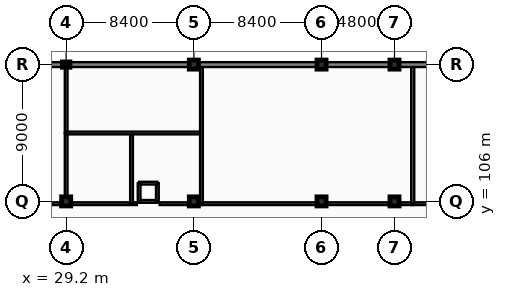
"""IFC4 building model, lengths in metres.
Left out: names, types, materials, properties, quantities, classifications, styles, units other than length and angle.
Written with IfcOpenShell. Run it as: python <this file> out.ifc"""

import sys

from ifc_helpers import new_model, si_unit, direction, frame, frame_2d, origin, origin_2d, place, context, subcontext, project, spatial, rectangle, extrude, element, fill, save


model = new_model("IFC4")
c1 = context("Model", 3, precision=1e-05, world=origin(), true_north=direction((0.0, 1.0)))
c2 = subcontext(c1, "Body", "Model", "MODEL_VIEW")
j1 = project(units=[si_unit("LENGTHUNIT", "METRE"), si_unit("PLANEANGLEUNIT", "RADIAN")], contexts=[c1])
p1 = place(None, origin())
s1 = spatial("IfcSite", under=j1, at=p1, CompositionType="ELEMENT")
p2 = place(p1, origin())
s2 = spatial("IfcBuilding", under=s1, at=p2, CompositionType="ELEMENT")
p3 = place(p2, origin())
s3 = spatial("IfcBuildingStorey", under=s2, at=p3, CompositionType="ELEMENT", Elevation=0.0)
p4 = place(p3, frame((29.2, 106.0, 0.0), z_axis=(0.0, 0.0, 1.0), x_axis=(1.0, 0.0, 0.0)))
e1 = element("IfcColumn", 1, at=p4, inside=s3, PredefinedType="COLUMN", context=c2, shape_type="SweptSolid", body=[
    extrude(rectangle(XDim=0.6, YDim=0.6, at=origin_2d()), origin(), (0.0, 0.0, 1.0), 5.4),
])
p5 = place(p3, frame((29.2, 115.0, 0.0), z_axis=(0.0, 0.0, 1.0), x_axis=(1.0, 0.0, 0.0)))
e2 = element("IfcColumn", 2, at=p5, inside=s3, PredefinedType="PILASTER", context=c2, shape_type="SweptSolid", body=[
    extrude(rectangle(XDim=0.5, YDim=0.35, at=origin_2d()), origin(), (0.0, 0.0, 1.0), 5.4),
])
for number, where, z_axis, x_axis in (
    (3, (37.6, 106.0, 0.0), (0.0, 0.0, 1.0), (1.0, 0.0, 0.0)),
    (4, (37.6, 115.0, 0.0), (0.0, 0.0, 1.0), (1.0, 0.0, 0.0)),
    (5, (46.0, 106.0, 0.0), (0.0, 0.0, 1.0), (1.0, 0.0, 0.0)),
    (6, (46.0, 115.0, 0.0), (0.0, 0.0, 1.0), (1.0, 0.0, 0.0)),
    (7, (50.8, 106.0, 0.0), (0.0, 0.0, 1.0), (1.0, 0.0, 0.0)),
    (8, (50.8, 115.0, 0.0), (0.0, 0.0, 1.0), (1.0, 0.0, 0.0)),
):
    element("IfcColumn", number, at=place(p3, frame(where, z_axis=z_axis, x_axis=x_axis)), inside=s3, PredefinedType="COLUMN", context=c2, shape_type="SweptSolid", body=[
        extrude(rectangle(XDim=0.6, YDim=0.6, at=origin_2d()), origin(), (0.0, 0.0, 1.0), 5.4),
    ])
p6 = place(p3, frame((4.15, 105.85, 0.0), z_axis=(0.0, 0.0, 1.0), x_axis=(1.0, 0.0, 0.0)))
e9 = element("IfcWall", 9, at=p6, inside=s3, PredefinedType="PARTITIONING", context=c2, shape_type="SweptSolid", body=[
    extrude(rectangle(XDim=25.05, YDim=0.18, at=frame_2d((12.525, 0.0))), origin(), (0.0, 0.0, 1.0), 4.54),
])
p7 = place(p6, frame((10.822, 0.0, -0.01)))
e10 = element("IfcOpeningElement", 10, at=p7, cuts=e9, PredefinedType="OPENING", context=c2, shape_type="SweptSolid", body=[
    extrude(rectangle(XDim=1.0, YDim=2.16, at=frame_2d((0.5, 1.08))), frame((0.0, 0.1, 0.0), z_axis=(0.0, -1.0, 0.0), x_axis=(1.0, 0.0, 0.0)), (0.0, 0.0, 1.0), 0.2),
])
p8 = place(p3, frame((29.2, 105.85, 0.0), z_axis=(0.0, 0.0, 1.0), x_axis=(1.0, 0.0, 0.0)))
e11 = element("IfcWall", 11, at=p8, inside=s3, PredefinedType="PARTITIONING", context=c2, shape_type="SweptSolid", body=[
    extrude(rectangle(XDim=4.65, YDim=0.18, at=frame_2d((2.325, 0.0))), origin(), (0.0, 0.0, 1.0), 4.54),
])
p9 = place(p8, frame((1.643, 0.0, -0.01)))
e12 = element("IfcOpeningElement", 12, at=p9, cuts=e11, PredefinedType="OPENING", context=c2, shape_type="SweptSolid", body=[
    extrude(rectangle(XDim=1.0, YDim=2.16, at=frame_2d((0.5, 1.08))), frame((0.0, 0.1, 0.0), z_axis=(0.0, -1.0, 0.0), x_axis=(1.0, 0.0, 0.0)), (0.0, 0.0, 1.0), 0.2),
])
p10 = place(p3, frame((35.35, 105.85, 0.0), z_axis=(0.0, 0.0, 1.0), x_axis=(1.0, 0.0, 0.0)))
e13 = element("IfcWall", 13, at=p10, inside=s3, PredefinedType="PARTITIONING", context=c2, shape_type="SweptSolid", body=[
    extrude(rectangle(XDim=2.75, YDim=0.18, at=frame_2d((1.375, 0.0))), origin(), (0.0, 0.0, 1.0), 4.54),
])
p11 = place(p10, frame((0.28, 0.0, -0.01)))
e14 = element("IfcOpeningElement", 14, at=p11, cuts=e13, PredefinedType="OPENING", context=c2, shape_type="SweptSolid", body=[
    extrude(rectangle(XDim=1.0, YDim=2.16, at=frame_2d((0.5, 1.08))), frame((0.0, 0.1, 0.0), z_axis=(0.0, -1.0, 0.0), x_axis=(1.0, 0.0, 0.0)), (0.0, 0.0, 1.0), 0.2),
])
p12 = place(p3, frame((38.1, 105.85, 0.0), z_axis=(0.0, 0.0, 1.0), x_axis=(1.0, 0.0, 0.0)))
e15 = element("IfcWall", 15, at=p12, inside=s3, PredefinedType="PARTITIONING", context=c2, shape_type="SweptSolid", body=[
    extrude(rectangle(XDim=13.9, YDim=0.18, at=frame_2d((6.95, 0.0))), origin(), (0.0, 0.0, 1.0), 4.54),
])
p13 = place(p12, frame((5.805, 0.0, -0.01)))
e16 = element("IfcOpeningElement", 16, at=p13, cuts=e15, PredefinedType="OPENING", context=c2, shape_type="SweptSolid", body=[
    extrude(rectangle(XDim=1.0, YDim=2.16, at=frame_2d((0.5, 1.08))), frame((0.0, 0.1, 0.0), z_axis=(0.0, -1.0, 0.0), x_axis=(1.0, 0.0, 0.0)), (0.0, 0.0, 1.0), 0.2),
])
p14 = place(p3, frame((52.0, 105.85, 0.0), z_axis=(0.0, 0.0, 1.0), x_axis=(1.0, 0.0, 0.0)))
e17 = element("IfcWall", 17, at=p14, inside=s3, PredefinedType="PARTITIONING", context=c2, shape_type="SweptSolid", body=[
    extrude(rectangle(XDim=23.4, YDim=0.18, at=frame_2d((11.7, 0.0))), origin(), (0.0, 0.0, 1.0), 4.54),
])
p15 = place(p3, frame((29.2, 105.85, 0.0), z_axis=(0.0, 0.0, 1.0), x_axis=(0.0, 1.0, 0.0)))
e18 = element("IfcWall", 18, at=p15, inside=s3, PredefinedType="PARTITIONING", context=c2, shape_type="SweptSolid", body=[
    extrude(rectangle(XDim=4.65, YDim=0.18, at=frame_2d((2.325, 0.0))), origin(), (0.0, 0.0, 1.0), 4.54),
])
p16 = place(p3, frame((29.2, 110.5, 0.0), z_axis=(0.0, 0.0, 1.0), x_axis=(0.0, 1.0, 0.0)))
e19 = element("IfcWall", 19, at=p16, inside=s3, PredefinedType="PARTITIONING", context=c2, shape_type="SweptSolid", body=[
    extrude(rectangle(XDim=4.35, YDim=0.18, at=frame_2d((2.175, 0.0))), origin(), (0.0, 0.0, 1.0), 4.64),
])
p17 = place(p16, frame((1.675, 0.0, -0.01)))
e20 = element("IfcOpeningElement", 20, at=p17, cuts=e19, PredefinedType="OPENING", context=c2, shape_type="SweptSolid", body=[
    extrude(rectangle(XDim=1.0, YDim=2.16, at=frame_2d((0.5, 1.08))), frame((0.0, 0.1, 0.0), z_axis=(0.0, -1.0, 0.0), x_axis=(1.0, 0.0, 0.0)), (0.0, 0.0, 1.0), 0.2),
])
p18 = place(p3, frame((33.5, 105.85, 0.0), z_axis=(0.0, 0.0, 1.0), x_axis=(0.0, 1.0, 0.0)))
e21 = element("IfcWall", 21, at=p18, inside=s3, PredefinedType="PARTITIONING", context=c2, shape_type="SweptSolid", body=[
    extrude(rectangle(XDim=4.65, YDim=0.18, at=frame_2d((2.325, 0.0))), origin(), (0.0, 0.0, 1.0), 5.04),
])
p19 = place(p3, frame((29.2, 110.5, 0.0), z_axis=(0.0, 0.0, 1.0), x_axis=(1.0, 0.0, 0.0)))
e22 = element("IfcWall", 22, at=p19, inside=s3, PredefinedType="PARTITIONING", context=c2, shape_type="SweptSolid", body=[
    extrude(rectangle(XDim=8.9, YDim=0.18, at=frame_2d((4.45, 0.0))), origin(), (0.0, 0.0, 1.0), 4.64),
])
p20 = place(p19, frame((1.975, 0.0, -0.01)))
e23 = element("IfcOpeningElement", 23, at=p20, cuts=e22, PredefinedType="OPENING", context=c2, shape_type="SweptSolid", body=[
    extrude(rectangle(XDim=1.0, YDim=2.16, at=frame_2d((0.5, 1.08))), frame((0.0, 0.1, 0.0), z_axis=(0.0, -1.0, 0.0), x_axis=(1.0, 0.0, 0.0)), (0.0, 0.0, 1.0), 0.2),
])
p21 = place(p3, frame((38.1, 105.85, 0.0), z_axis=(0.0, 0.0, 1.0), x_axis=(0.0, 1.0, 0.0)))
e24 = element("IfcWall", 24, at=p21, inside=s3, PredefinedType="PARTITIONING", context=c2, shape_type="SweptSolid", body=[
    extrude(rectangle(XDim=9.0, YDim=0.18, at=frame_2d((4.5, 0.0))), origin(), (0.0, 0.0, 1.0), 4.54),
])
p22 = place(p3, frame((52.0, 105.85, 0.0), z_axis=(0.0, 0.0, 1.0), x_axis=(0.0, 1.0, 0.0)))
e25 = element("IfcWall", 25, at=p22, inside=s3, PredefinedType="PARTITIONING", context=c2, shape_type="SweptSolid", body=[
    extrude(rectangle(XDim=9.0, YDim=0.2, at=frame_2d((4.5, 0.0))), origin(), (0.0, 0.0, 1.0), 4.54),
])
p23 = place(p3, frame((29.2, 115.0, 0.0), z_axis=(0.0, 0.0, 1.0), x_axis=(-1.0, 0.0, 0.0)))
e26 = element("IfcWall", 26, at=p23, inside=s3, PredefinedType="SOLIDWALL", context=c2, shape_type="SweptSolid", body=[
    extrude(rectangle(XDim=8.4, YDim=0.32, at=frame_2d((4.2, 0.0))), origin(), (0.0, 0.0, 1.0), 4.64),
])
p24 = place(p23, frame((0.46, 0.0, 0.9)))
e27 = element("IfcOpeningElement", 27, at=p24, cuts=e26, PredefinedType="OPENING", context=c2, shape_type="SweptSolid", body=[
    extrude(rectangle(XDim=2.4, YDim=2.35, at=frame_2d((1.2, 1.175))), frame((0.0, 0.17, 0.0), z_axis=(0.0, -1.0, 0.0), x_axis=(1.0, 0.0, 0.0)), (0.0, 0.0, 1.0), 0.34),
])
p25 = place(p23, frame((5.46, 0.0, 0.9)))
e28 = element("IfcOpeningElement", 28, at=p25, cuts=e26, PredefinedType="OPENING", context=c2, shape_type="SweptSolid", body=[
    extrude(rectangle(XDim=2.4, YDim=2.35, at=frame_2d((1.2, 1.175))), frame((0.0, 0.17, 0.0), z_axis=(0.0, -1.0, 0.0), x_axis=(1.0, 0.0, 0.0)), (0.0, 0.0, 1.0), 0.34),
])
p26 = place(p3, frame((37.6, 115.0, 0.0), z_axis=(0.0, 0.0, 1.0), x_axis=(-1.0, 0.0, 0.0)))
e29 = element("IfcWall", 29, at=p26, inside=s3, PredefinedType="SOLIDWALL", context=c2, shape_type="SweptSolid", body=[
    extrude(rectangle(XDim=8.4, YDim=0.32, at=frame_2d((4.2, 0.0))), origin(), (0.0, 0.0, 1.0), 4.64),
])
p27 = place(p26, frame((0.46, 0.0, 0.9)))
e30 = element("IfcOpeningElement", 30, at=p27, cuts=e29, PredefinedType="OPENING", context=c2, shape_type="SweptSolid", body=[
    extrude(rectangle(XDim=2.4, YDim=2.35, at=frame_2d((1.2, 1.175))), frame((0.0, 0.17, 0.0), z_axis=(0.0, -1.0, 0.0), x_axis=(1.0, 0.0, 0.0)), (0.0, 0.0, 1.0), 0.34),
])
p28 = place(p26, frame((5.46, 0.0, 0.9)))
e31 = element("IfcOpeningElement", 31, at=p28, cuts=e29, PredefinedType="OPENING", context=c2, shape_type="SweptSolid", body=[
    extrude(rectangle(XDim=2.4, YDim=2.35, at=frame_2d((1.2, 1.175))), frame((0.0, 0.17, 0.0), z_axis=(0.0, -1.0, 0.0), x_axis=(1.0, 0.0, 0.0)), (0.0, 0.0, 1.0), 0.34),
])
p29 = place(p3, frame((46.0, 115.0, 0.0), z_axis=(0.0, 0.0, 1.0), x_axis=(-1.0, 0.0, 0.0)))
e32 = element("IfcWall", 32, at=p29, inside=s3, PredefinedType="SOLIDWALL", context=c2, shape_type="SweptSolid", body=[
    extrude(rectangle(XDim=8.4, YDim=0.32, at=frame_2d((4.2, 0.0))), origin(), (0.0, 0.0, 1.0), 4.64),
])
p30 = place(p29, frame((3.2, 0.0, -0.01)))
e33 = element("IfcOpeningElement", 33, at=p30, cuts=e32, PredefinedType="OPENING", context=c2, shape_type="SweptSolid", body=[
    extrude(rectangle(XDim=2.0, YDim=2.41, at=frame_2d((1.0, 1.205))), frame((0.0, 0.17, 0.0), z_axis=(0.0, -1.0, 0.0), x_axis=(1.0, 0.0, 0.0)), (0.0, 0.0, 1.0), 0.34),
])
p31 = place(p3, frame((50.8, 115.0, 0.0), z_axis=(0.0, 0.0, 1.0), x_axis=(-1.0, 0.0, 0.0)))
e34 = element("IfcWall", 34, at=p31, inside=s3, PredefinedType="SOLIDWALL", context=c2, shape_type="SweptSolid", body=[
    extrude(rectangle(XDim=4.8, YDim=0.32, at=frame_2d((2.4, 0.0))), origin(), (0.0, 0.0, 1.0), 4.64),
])
p32 = place(p31, frame((1.46, 0.0, 0.9)))
e35 = element("IfcOpeningElement", 35, at=p32, cuts=e34, PredefinedType="OPENING", context=c2, shape_type="SweptSolid", body=[
    extrude(rectangle(XDim=1.8, YDim=2.2, at=frame_2d((0.9, 1.1))), frame((0.0, 0.17, 0.0), z_axis=(0.0, -1.0, 0.0), x_axis=(1.0, 0.0, 0.0)), (0.0, 0.0, 1.0), 0.34),
])
p33 = place(p3, frame((58.0, 115.0, 0.0), z_axis=(0.0, 0.0, 1.0), x_axis=(-1.0, 0.0, 0.0)))
e36 = element("IfcWall", 36, at=p33, inside=s3, PredefinedType="SOLIDWALL", context=c2, shape_type="SweptSolid", body=[
    extrude(rectangle(XDim=7.2, YDim=0.32, at=frame_2d((3.6, 0.0))), origin(), (0.0, 0.0, 1.0), 4.64),
])
p34 = place(p33, frame((0.46, 0.0, 0.9)))
e37 = element("IfcOpeningElement", 37, at=p34, cuts=e36, PredefinedType="OPENING", context=c2, shape_type="SweptSolid", body=[
    extrude(rectangle(XDim=1.8, YDim=2.2, at=frame_2d((0.9, 1.1))), frame((0.0, 0.17, 0.0), z_axis=(0.0, -1.0, 0.0), x_axis=(1.0, 0.0, 0.0)), (0.0, 0.0, 1.0), 0.34),
])
p35 = place(p33, frame((3.86, 0.0, 0.9)))
e38 = element("IfcOpeningElement", 38, at=p35, cuts=e36, PredefinedType="OPENING", context=c2, shape_type="SweptSolid", body=[
    extrude(rectangle(XDim=1.8, YDim=2.2, at=frame_2d((0.9, 1.1))), frame((0.0, 0.17, 0.0), z_axis=(0.0, -1.0, 0.0), x_axis=(1.0, 0.0, 0.0)), (0.0, 0.0, 1.0), 0.34),
])
p36 = place(p3, frame((34.0, 106.0, 0.0), z_axis=(0.0, 0.0, 1.0), x_axis=(1.0, 0.0, 0.0)))
e39 = element("IfcWall", 39, at=p36, inside=s3, PredefinedType="SOLIDWALL", context=c2, shape_type="SweptSolid", body=[
    extrude(rectangle(XDim=1.2, YDim=0.18, at=frame_2d((0.6, 0.0))), origin(), (0.0, 0.0, 1.0), 5.07),
])
p37 = place(p36, frame((0.2, 0.0, -0.01)))
e40 = element("IfcOpeningElement", 40, at=p37, cuts=e39, PredefinedType="OPENING", context=c2, shape_type="SweptSolid", body=[
    extrude(rectangle(XDim=0.8, YDim=2.06, at=frame_2d((0.4, 1.03))), frame((0.0, 0.1, 0.0), z_axis=(0.0, -1.0, 0.0), x_axis=(1.0, 0.0, 0.0)), (0.0, 0.0, 1.0), 0.2),
])
for number, where, z_axis, x_axis in (
    (41, (35.2, 106.0, 0.0), (0.0, 0.0, 1.0), (0.0, 1.0, 0.0)),
    (42, (35.2, 107.2, 0.0), (0.0, 0.0, 1.0), (-1.0, 0.0, 0.0)),
    (43, (34.0, 107.2, 0.0), (0.0, 0.0, 1.0), (0.0, -1.0, 0.0)),
):
    element("IfcWall", number, at=place(p3, frame(where, z_axis=z_axis, x_axis=x_axis)), inside=s3, PredefinedType="SOLIDWALL", context=c2, shape_type="SweptSolid", body=[
        extrude(rectangle(XDim=1.2, YDim=0.18, at=frame_2d((0.6, 0.0))), origin(), (0.0, 0.0, 1.0), 5.07),
    ])
p38 = place(p9, frame((1.0, 0.0, 0.01), z_axis=(0.0, 0.0, 1.0), x_axis=(-1.0, 0.0, 0.0)))
e44 = element("IfcDoor", 44, at=p38, inside=s3, OperationType="SINGLE_SWING_LEFT", PredefinedType="DOOR", context=c2, shape_type="SweptSolid", body=[
    extrude(rectangle(XDim=1.0, YDim=2.15, at=frame_2d((0.5, 1.075))), frame((0.0, 0.025, 0.0), z_axis=(0.0, -1.0, 0.0), x_axis=(1.0, 0.0, 0.0)), (0.0, 0.0, 1.0), 0.05),
])
fill(e12, e44)
p39 = place(p11, frame((0.0, 0.0, 0.01)))
e45 = element("IfcDoor", 45, at=p39, inside=s3, OperationType="SINGLE_SWING_RIGHT", PredefinedType="DOOR", context=c2, shape_type="SweptSolid", body=[
    extrude(rectangle(XDim=1.0, YDim=2.15, at=frame_2d((0.5, 1.075))), frame((0.0, 0.025, 0.0), z_axis=(0.0, -1.0, 0.0), x_axis=(1.0, 0.0, 0.0)), (0.0, 0.0, 1.0), 0.05),
])
fill(e14, e45)
p40 = place(p13, frame((0.0, 0.0, 0.01)))
e46 = element("IfcDoor", 46, at=p40, inside=s3, OperationType="SINGLE_SWING_LEFT", PredefinedType="DOOR", context=c2, shape_type="SweptSolid", body=[
    extrude(rectangle(XDim=1.0, YDim=2.15, at=frame_2d((0.5, 1.075))), frame((0.0, 0.025, 0.0), z_axis=(0.0, -1.0, 0.0), x_axis=(1.0, 0.0, 0.0)), (0.0, 0.0, 1.0), 0.05),
])
fill(e16, e46)
p41 = place(p17, frame((1.0, 0.0, 0.01), z_axis=(0.0, 0.0, 1.0), x_axis=(-1.0, 0.0, 0.0)))
e47 = element("IfcDoor", 47, at=p41, inside=s3, OperationType="SINGLE_SWING_RIGHT", PredefinedType="DOOR", context=c2, shape_type="SweptSolid", body=[
    extrude(rectangle(XDim=1.0, YDim=2.15, at=frame_2d((0.5, 1.075))), frame((0.0, 0.025, 0.0), z_axis=(0.0, -1.0, 0.0), x_axis=(1.0, 0.0, 0.0)), (0.0, 0.0, 1.0), 0.05),
])
fill(e20, e47)
p42 = place(p20, frame((0.0, 0.0, 0.01)))
e48 = element("IfcDoor", 48, at=p42, inside=s3, OperationType="SINGLE_SWING_LEFT", PredefinedType="DOOR", context=c2, shape_type="SweptSolid", body=[
    extrude(rectangle(XDim=1.0, YDim=2.15, at=frame_2d((0.5, 1.075))), frame((0.0, 0.025, 0.0), z_axis=(0.0, -1.0, 0.0), x_axis=(1.0, 0.0, 0.0)), (0.0, 0.0, 1.0), 0.05),
])
fill(e23, e48)
p43 = place(p24, origin())
e49 = element("IfcWindow", 49, at=p43, inside=s3, PartitioningType="TRIPLE_PANEL_VERTICAL", PredefinedType="WINDOW", context=c2, shape_type="SweptSolid", body=[
    extrude(rectangle(XDim=2.4, YDim=2.35, at=frame_2d((1.2, 1.175))), frame((0.0, 0.03, 0.0), z_axis=(0.0, -1.0, 0.0), x_axis=(1.0, 0.0, 0.0)), (0.0, 0.0, 1.0), 0.06),
])
fill(e27, e49)
p44 = place(p27, origin())
e50 = element("IfcWindow", 50, at=p44, inside=s3, PartitioningType="TRIPLE_PANEL_VERTICAL", PredefinedType="WINDOW", context=c2, shape_type="SweptSolid", body=[
    extrude(rectangle(XDim=2.4, YDim=2.35, at=frame_2d((1.2, 1.175))), frame((0.0, 0.03, 0.0), z_axis=(0.0, -1.0, 0.0), x_axis=(1.0, 0.0, 0.0)), (0.0, 0.0, 1.0), 0.06),
])
fill(e30, e50)
p45 = place(p28, origin())
e51 = element("IfcWindow", 51, at=p45, inside=s3, PartitioningType="TRIPLE_PANEL_VERTICAL", PredefinedType="WINDOW", context=c2, shape_type="SweptSolid", body=[
    extrude(rectangle(XDim=2.4, YDim=2.35, at=frame_2d((1.2, 1.175))), frame((0.0, 0.03, 0.0), z_axis=(0.0, -1.0, 0.0), x_axis=(1.0, 0.0, 0.0)), (0.0, 0.0, 1.0), 0.06),
])
fill(e31, e51)
p46 = place(p30, frame((0.0, 0.0, 0.01)))
e52 = element("IfcDoor", 52, at=p46, inside=s3, OperationType="DOUBLE_SWING_LEFT", PredefinedType="DOOR", context=c2, shape_type="SweptSolid", body=[
    extrude(rectangle(XDim=2.0, YDim=2.4, at=frame_2d((1.0, 1.2))), frame((0.0, 0.025, 0.0), z_axis=(0.0, -1.0, 0.0), x_axis=(1.0, 0.0, 0.0)), (0.0, 0.0, 1.0), 0.05),
])
fill(e33, e52)
p47 = place(p32, origin())
e53 = element("IfcWindow", 53, at=p47, inside=s3, PartitioningType="DOUBLE_PANEL_VERTICAL", PredefinedType="WINDOW", context=c2, shape_type="SweptSolid", body=[
    extrude(rectangle(XDim=1.8, YDim=2.2, at=frame_2d((0.9, 1.1))), frame((0.0, 0.03, 0.0), z_axis=(0.0, -1.0, 0.0), x_axis=(1.0, 0.0, 0.0)), (0.0, 0.0, 1.0), 0.06),
])
fill(e35, e53)
p48 = place(p35, origin())
e54 = element("IfcWindow", 54, at=p48, inside=s3, PartitioningType="DOUBLE_PANEL_VERTICAL", PredefinedType="WINDOW", context=c2, shape_type="SweptSolid", body=[
    extrude(rectangle(XDim=1.8, YDim=2.2, at=frame_2d((0.9, 1.1))), frame((0.0, 0.03, 0.0), z_axis=(0.0, -1.0, 0.0), x_axis=(1.0, 0.0, 0.0)), (0.0, 0.0, 1.0), 0.06),
])
fill(e38, e54)
p49 = place(p37, frame((0.0, 0.0, 0.01)))
e55 = element("IfcDoor", 55, at=p49, inside=s3, OperationType="SINGLE_SWING_LEFT", PredefinedType="DOOR", context=c2, shape_type="SweptSolid", body=[
    extrude(rectangle(XDim=0.8, YDim=2.05, at=frame_2d((0.4, 1.025))), frame((0.0, 0.025, 0.0), z_axis=(0.0, -1.0, 0.0), x_axis=(1.0, 0.0, 0.0)), (0.0, 0.0, 1.0), 0.05),
])
fill(e40, e55)
save(model, sys.argv[1])
